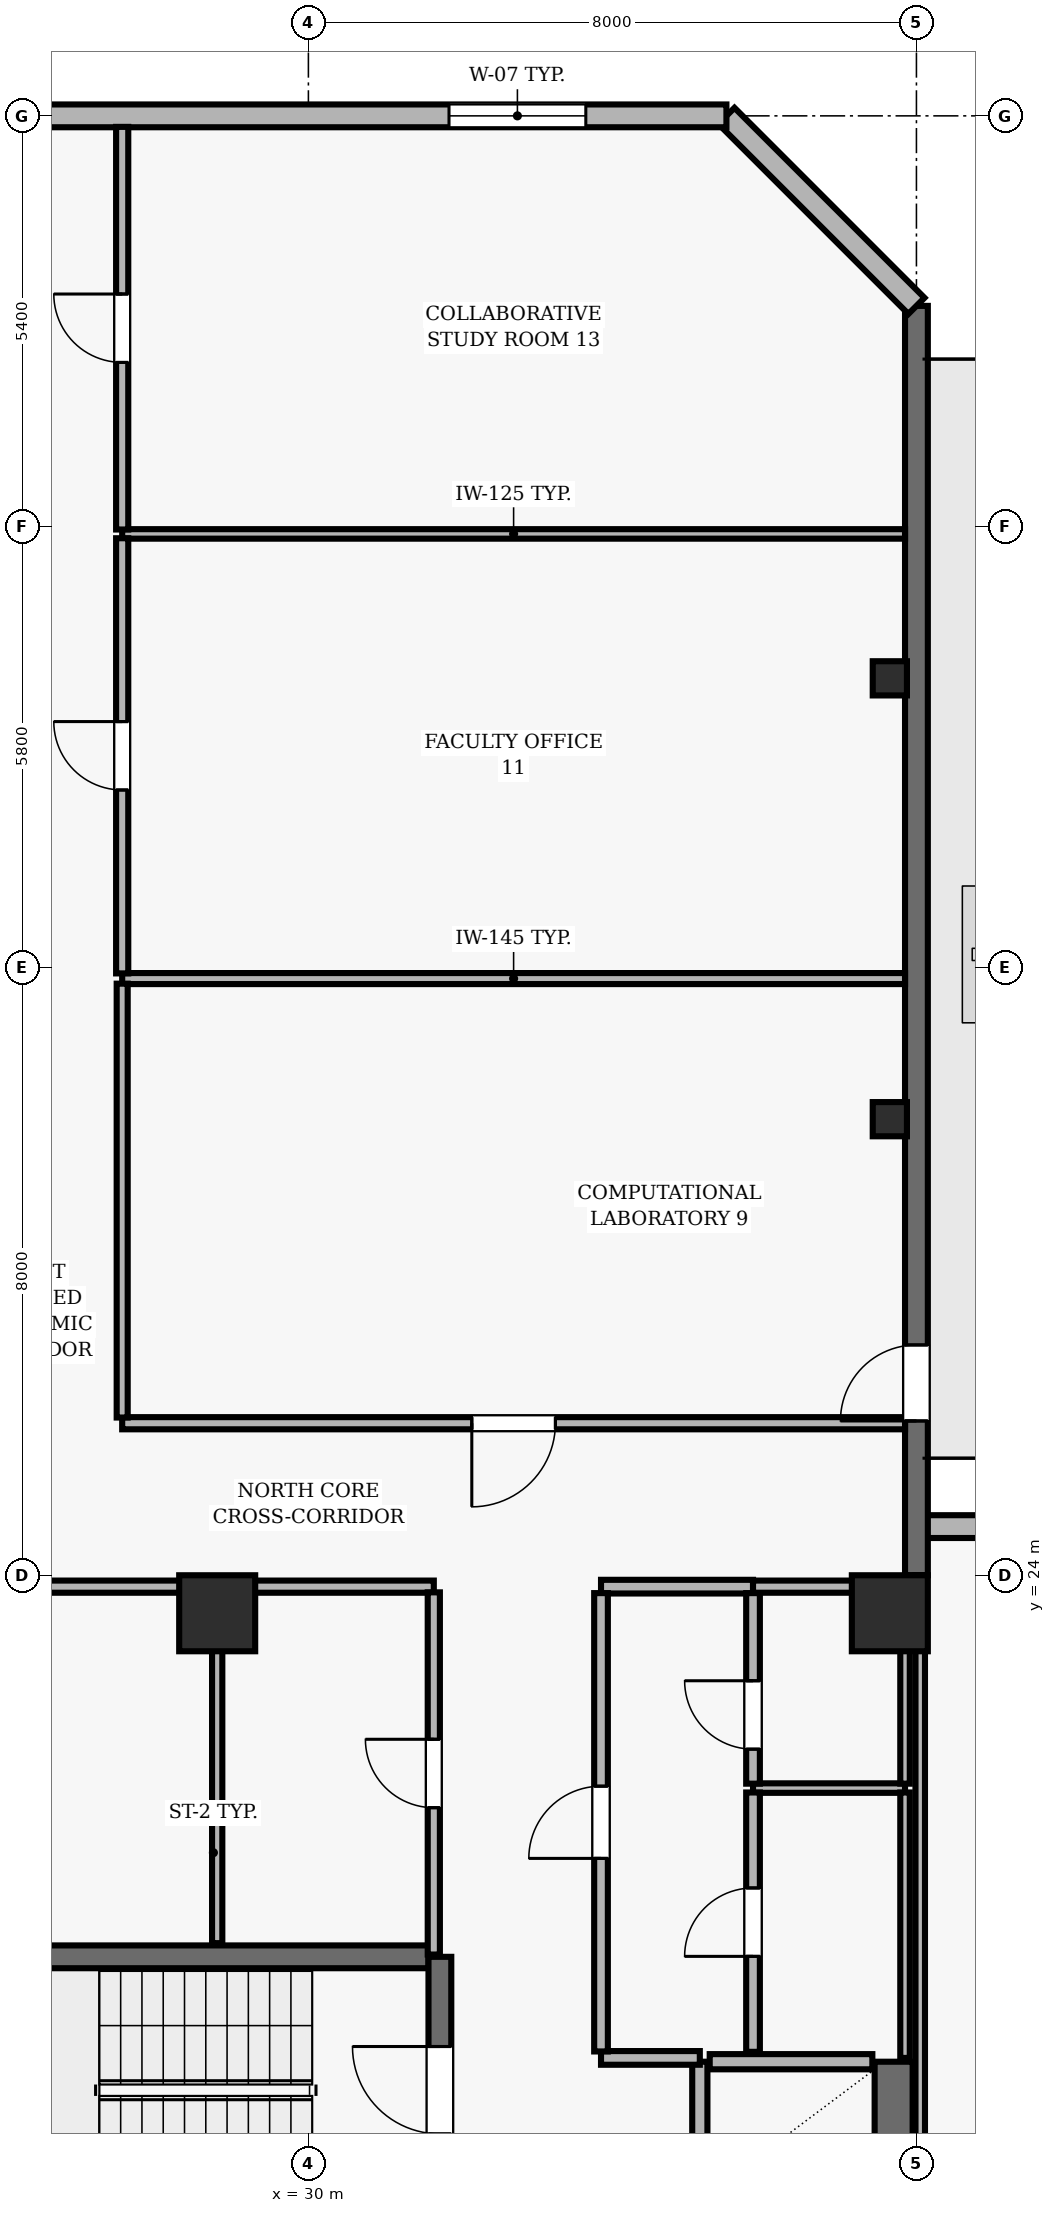
"""IFC4 building model, lengths in metres.
Left out: names, types, materials, properties, quantities, classifications, styles, units other than length and angle.
Written with IfcOpenShell. Run it as: python <this file> out.ifc"""

import sys

from ifc_helpers import new_model, si_unit, direction, frame, frame_2d, origin, origin_2d, place, context, subcontext, project, spatial, rectangle, hollow_rectangle, extrude, element, fill, save


model = new_model("IFC4")
c1 = context("Model", 3, precision=1e-05, world=origin(), true_north=direction((0.0, 1.0)))
c2 = subcontext(c1, "Body", "Model", "MODEL_VIEW")
j1 = project(units=[si_unit("LENGTHUNIT", "METRE"), si_unit("PLANEANGLEUNIT", "RADIAN")], contexts=[c1])
p1 = place(None, origin())
s1 = spatial("IfcSite", under=j1, at=p1, CompositionType="ELEMENT")
p2 = place(p1, origin())
s2 = spatial("IfcBuilding", under=s1, at=p2, CompositionType="ELEMENT")
p3 = place(p2, frame((0.0, 0.0, 183.6)))
s3 = spatial("IfcBuildingStorey", under=s2, at=p3, CompositionType="ELEMENT", Elevation=183.6)
for number, where, z_axis, x_axis in (
    (1, (28.8, 23.5, 0.0), (0.0, 0.0, 1.0), (1.0, 0.0, 0.0)),
    (2, (37.65, 23.5, 0.0), (0.0, 0.0, 1.0), (1.0, 0.0, 0.0)),
):
    element("IfcColumn", number, at=place(p3, frame(where, z_axis=z_axis, x_axis=x_axis)), inside=s3, PredefinedType="COLUMN", context=c2, shape_type="SweptSolid", body=[
        extrude(rectangle(XDim=1.0, YDim=1.0, at=origin_2d()), origin(), (0.0, 0.0, 1.0), 3.9),
    ])
for number, where, z_axis, x_axis in (
    (3, (37.65, 30.0, 0.0), (0.0, 0.0, 1.0), (1.0, 0.0, 0.0)),
    (4, (37.65, 35.8, 0.0), (0.0, 0.0, 1.0), (1.0, 0.0, 0.0)),
):
    element("IfcColumn", number, at=place(p3, frame(where, z_axis=z_axis, x_axis=x_axis)), inside=s3, PredefinedType="COLUMN", context=c2, shape_type="SweptSolid", body=[
        extrude(hollow_rectangle(XDim=0.45, YDim=0.45, WallThickness=0.02, at=origin_2d()), origin(), (0.0, 0.0, 1.0), 3.9),
    ])
p4 = place(p3, frame((48.8, 24.64, 0.0), z_axis=(0.0, 0.0, 1.0), x_axis=(-1.0, 0.0, 0.0)))
e5 = element("IfcWall", 5, at=p4, inside=s3, PredefinedType="SOLIDWALL", context=c2, shape_type="SweptSolid", body=[
    extrude(rectangle(XDim=10.8, YDim=0.3, at=frame_2d((5.4, 0.0))), origin(), (0.0, 0.0, 1.0), 3.69),
])
p5 = place(p4, frame((4.35, 0.0, 0.9)))
e6 = element("IfcOpeningElement", 6, at=p5, cuts=e5, PredefinedType="OPENING", context=c2, shape_type="SweptSolid", body=[
    extrude(rectangle(XDim=2.1, YDim=1.6, at=frame_2d((1.05, 0.8))), frame((0.0, 0.16, 0.0), z_axis=(0.0, -1.0, 0.0), x_axis=(1.0, 0.0, 0.0)), (0.0, 0.0, 1.0), 0.32),
])
p6 = place(p3, frame((38.0, 24.0, 0.0), z_axis=(0.0, 0.0, 1.0), x_axis=(0.0, 1.0, 0.0)))
e7 = element("IfcWall", 7, at=p6, inside=s3, PredefinedType="SOLIDWALL", context=c2, shape_type="SweptSolid", body=[
    extrude(rectangle(XDim=16.7, YDim=0.3, at=frame_2d((8.35, 0.0))), origin(), (0.0, 0.0, 1.0), 3.69),
])
p7 = place(p6, frame((2.03, 0.0, 0.0)))
e8 = element("IfcOpeningElement", 8, at=p7, cuts=e7, PredefinedType="OPENING", context=c2, shape_type="SweptSolid", body=[
    extrude(rectangle(XDim=1.0, YDim=2.2, at=frame_2d((0.5, 1.1))), frame((0.0, 0.16, 0.0), z_axis=(0.0, -1.0, 0.0), x_axis=(1.0, 0.0, 0.0)), (0.0, 0.0, 1.0), 0.32),
])
p8 = place(p3, frame((38.0, 40.7, 0.0), z_axis=(0.0, 0.0, 1.0), x_axis=(-0.707106781187, 0.707106781187, 0.0)))
e9 = element("IfcWall", 9, at=p8, inside=s3, PredefinedType="SOLIDWALL", context=c2, shape_type="SweptSolid", body=[
    extrude(rectangle(XDim=3.536, YDim=0.3, at=frame_2d((1.768, 0.0))), origin(), (0.0, 0.0, 1.0), 3.69),
])
p9 = place(p3, frame((35.5, 43.2, 0.0), z_axis=(0.0, 0.0, 1.0), x_axis=(-1.0, 0.0, 0.0)))
e10 = element("IfcWall", 10, at=p9, inside=s3, PredefinedType="SOLIDWALL", context=c2, shape_type="SweptSolid", body=[
    extrude(rectangle(XDim=11.0, YDim=0.3, at=frame_2d((5.5, 0.0))), origin(), (0.0, 0.0, 1.0), 3.69),
])
p10 = place(p9, frame((1.85, 0.0, 0.9)))
e11 = element("IfcOpeningElement", 11, at=p10, cuts=e10, PredefinedType="OPENING", context=c2, shape_type="SweptSolid", body=[
    extrude(rectangle(XDim=1.8, YDim=1.8, at=frame_2d((0.9, 0.9))), frame((0.0, 0.16, 0.0), z_axis=(0.0, -1.0, 0.0), x_axis=(1.0, 0.0, 0.0)), (0.0, 0.0, 1.0), 0.32),
])
p11 = place(p3, frame((31.58, 18.98, 0.0), z_axis=(0.0, 0.0, 1.0), x_axis=(-1.0, 0.0, 0.0)))
e12 = element("IfcWall", 12, at=p11, inside=s3, PredefinedType="SHEAR", context=c2, shape_type="SweptSolid", body=[
    extrude(rectangle(XDim=8.36, YDim=0.3, at=frame_2d((4.18, 0.0))), origin(), (0.0, 0.0, 1.0), 3.69),
])
p12 = place(p3, frame((31.73, 15.47, 0.0), z_axis=(0.0, 0.0, 1.0), x_axis=(0.0, 1.0, 0.0)))
e13 = element("IfcWall", 13, at=p12, inside=s3, PredefinedType="SHEAR", context=c2, shape_type="SweptSolid", body=[
    extrude(rectangle(XDim=3.51, YDim=0.3, at=frame_2d((1.755, 0.0))), origin(), (0.0, 0.0, 1.0), 3.69),
])
p13 = place(p12, frame((1.18, 0.0, 0.0)))
e14 = element("IfcOpeningElement", 14, at=p13, cuts=e13, PredefinedType="OPENING", context=c2, shape_type="SweptSolid", body=[
    extrude(rectangle(XDim=1.15, YDim=2.15, at=frame_2d((0.575, 1.075))), frame((0.0, 0.16, 0.0), z_axis=(0.0, -1.0, 0.0), x_axis=(1.0, 0.0, 0.0)), (0.0, 0.0, 1.0), 0.32),
])
p14 = place(p3, frame((35.15, 17.6, 0.0), z_axis=(0.0, 0.0, 1.0), x_axis=(0.0, -1.0, 0.0)))
e15 = element("IfcWall", 15, at=p14, inside=s3, PredefinedType="SOLIDWALL", context=c2, shape_type="SweptSolid", body=[
    extrude(rectangle(XDim=1.85, YDim=0.2, at=frame_2d((0.925, 0.0))), origin(), (0.0, 0.0, 1.0), 3.69),
])
p15 = place(p3, frame((37.7, 15.75, 0.0), z_axis=(0.0, 0.0, 1.0), x_axis=(0.0, 1.0, 0.0)))
e16 = element("IfcWall", 16, at=p15, inside=s3, PredefinedType="SHEAR", context=c2, shape_type="SweptSolid", body=[
    extrude(rectangle(XDim=1.85, YDim=0.5, at=frame_2d((0.925, 0.0))), origin(), (0.0, 0.0, 1.0), 3.69),
])
p16 = place(p3, frame((37.42, 17.6, 0.0), z_axis=(0.0, 0.0, 1.0), x_axis=(-1.0, 0.0, 0.0)))
e17 = element("IfcWall", 17, at=p16, inside=s3, PredefinedType="SOLIDWALL", context=c2, shape_type="SweptSolid", body=[
    extrude(rectangle(XDim=2.14, YDim=0.2, at=frame_2d((1.07, 0.0))), origin(), (0.0, 0.0, 1.0), 3.69),
])
p17 = place(p3, frame((28.8, 23.85, 0.0), z_axis=(0.0, 0.0, 1.0), x_axis=(-1.0, 0.0, 0.0)))
e18 = element("IfcWall", 18, at=p17, inside=s3, PredefinedType="PARTITIONING", context=c2, shape_type="SweptSolid", body=[
    extrude(rectangle(XDim=6.6, YDim=0.16, at=frame_2d((3.3, 0.0))), origin(), (0.0, 0.0, 1.0), 3.139),
])
p18 = place(p17, frame((2.86, 0.0, 0.0)))
e19 = element("IfcOpeningElement", 19, at=p18, cuts=e18, PredefinedType="OPENING", context=c2, shape_type="SweptSolid", body=[
    extrude(rectangle(XDim=0.88, YDim=2.1, at=frame_2d((0.44, 1.05))), frame((0.0, 0.09, 0.0), z_axis=(0.0, -1.0, 0.0), x_axis=(1.0, 0.0, 0.0)), (0.0, 0.0, 1.0), 0.18),
])
p19 = place(p3, frame((31.65, 23.85, 0.0), z_axis=(0.0, 0.0, 1.0), x_axis=(-1.0, 0.0, 0.0)))
e20 = element("IfcWall", 20, at=p19, inside=s3, PredefinedType="PARTITIONING", context=c2, shape_type="SweptSolid", body=[
    extrude(rectangle(XDim=2.85, YDim=0.16, at=frame_2d((1.425, 0.0))), origin(), (0.0, 0.0, 1.0), 3.139),
])
p20 = place(p3, frame((33.85, 17.65, 0.0), z_axis=(0.0, 0.0, 1.0), x_axis=(1.0, 0.0, 0.0)))
e21 = element("IfcWall", 21, at=p20, inside=s3, PredefinedType="PARTITIONING", context=c2, shape_type="SweptSolid", body=[
    extrude(rectangle(XDim=1.3, YDim=0.18, at=frame_2d((0.65, 0.0))), origin(), (0.0, 0.0, 1.0), 3.69),
])
p21 = place(p3, frame((35.85, 21.2, 0.0), z_axis=(0.0, 0.0, 1.0), x_axis=(1.0, 0.0, 0.0)))
e22 = element("IfcWall", 22, at=p21, inside=s3, PredefinedType="PARTITIONING", context=c2, shape_type="SweptSolid", body=[
    extrude(rectangle(XDim=2.0, YDim=0.125, at=frame_2d((1.0, 0.0))), origin(), (0.0, 0.0, 1.0), 3.139),
])
p22 = place(p3, frame((35.85, 23.85, 0.0), z_axis=(0.0, 0.0, 1.0), x_axis=(-1.0, 0.0, 0.0)))
e23 = element("IfcWall", 23, at=p22, inside=s3, PredefinedType="PARTITIONING", context=c2, shape_type="SweptSolid", body=[
    extrude(rectangle(XDim=2.0, YDim=0.18, at=frame_2d((1.0, 0.0))), origin(), (0.0, 0.0, 1.0), 3.139),
])
p23 = place(p3, frame((37.85, 23.85, 0.0), z_axis=(0.0, 0.0, 1.0), x_axis=(-1.0, 0.0, 0.0)))
e24 = element("IfcWall", 24, at=p23, inside=s3, PredefinedType="PARTITIONING", context=c2, shape_type="SweptSolid", body=[
    extrude(rectangle(XDim=2.0, YDim=0.16, at=frame_2d((1.0, 0.0))), origin(), (0.0, 0.0, 1.0), 3.139),
])
p24 = place(p3, frame((37.85, 26.0, 0.0), z_axis=(0.0, 0.0, 1.0), x_axis=(-1.0, 0.0, 0.0)))
e25 = element("IfcWall", 25, at=p24, inside=s3, PredefinedType="PARTITIONING", context=c2, shape_type="SweptSolid", body=[
    extrude(rectangle(XDim=10.3, YDim=0.16, at=frame_2d((5.15, 0.0))), origin(), (0.0, 0.0, 1.0), 3.69),
])
p25 = place(p24, frame((4.6, 0.0, 0.0)))
e26 = element("IfcOpeningElement", 26, at=p25, cuts=e25, PredefinedType="OPENING", context=c2, shape_type="SweptSolid", body=[
    extrude(rectangle(XDim=1.1, YDim=2.15, at=frame_2d((0.55, 1.075))), frame((0.0, 0.09, 0.0), z_axis=(0.0, -1.0, 0.0), x_axis=(1.0, 0.0, 0.0)), (0.0, 0.0, 1.0), 0.18),
])
p26 = place(p3, frame((37.85, 31.85, 0.0), z_axis=(0.0, 0.0, 1.0), x_axis=(-1.0, 0.0, 0.0)))
e27 = element("IfcWall", 27, at=p26, inside=s3, PredefinedType="PARTITIONING", context=c2, shape_type="SweptSolid", body=[
    extrude(rectangle(XDim=10.3, YDim=0.145, at=frame_2d((5.15, 0.0))), origin(), (0.0, 0.0, 1.0), 3.69),
])
p27 = place(p3, frame((37.85, 37.7, 0.0), z_axis=(0.0, 0.0, 1.0), x_axis=(-1.0, 0.0, 0.0)))
e28 = element("IfcWall", 28, at=p27, inside=s3, PredefinedType="PARTITIONING", context=c2, shape_type="SweptSolid", body=[
    extrude(rectangle(XDim=10.3, YDim=0.125, at=frame_2d((5.15, 0.0))), origin(), (0.0, 0.0, 1.0), 3.69),
])
p28 = place(p3, frame((27.55, 26.075, 0.0), z_axis=(0.0, 0.0, 1.0), x_axis=(0.0, 1.0, 0.0)))
e29 = element("IfcWall", 29, at=p28, inside=s3, PredefinedType="PARTITIONING", context=c2, shape_type="SweptSolid", body=[
    extrude(rectangle(XDim=5.708, YDim=0.145, at=frame_2d((2.854, 0.0))), origin(), (0.0, 0.0, 1.0), 3.69),
])
p29 = place(p3, frame((27.55, 31.918, 0.0), z_axis=(0.0, 0.0, 1.0), x_axis=(0.0, 1.0, 0.0)))
e30 = element("IfcWall", 30, at=p29, inside=s3, PredefinedType="PARTITIONING", context=c2, shape_type="SweptSolid", body=[
    extrude(rectangle(XDim=5.725, YDim=0.16, at=frame_2d((2.863, 0.0))), origin(), (0.0, 0.0, 1.0), 3.69),
])
p30 = place(p29, frame((2.413, 0.0, 0.0)))
e31 = element("IfcOpeningElement", 31, at=p30, cuts=e30, PredefinedType="OPENING", context=c2, shape_type="SweptSolid", body=[
    extrude(rectangle(XDim=0.9, YDim=2.1, at=frame_2d((0.45, 1.05))), frame((0.0, 0.09, 0.0), z_axis=(0.0, -1.0, 0.0), x_axis=(1.0, 0.0, 0.0)), (0.0, 0.0, 1.0), 0.18),
])
p31 = place(p3, frame((27.55, 37.758, 0.0), z_axis=(0.0, 0.0, 1.0), x_axis=(0.0, 1.0, 0.0)))
e32 = element("IfcWall", 32, at=p31, inside=s3, PredefinedType="PARTITIONING", context=c2, shape_type="SweptSolid", body=[
    extrude(rectangle(XDim=5.297, YDim=0.16, at=frame_2d((2.648, 0.0))), origin(), (0.0, 0.0, 1.0), 3.69),
])
p32 = place(p31, frame((2.198, 0.0, 0.0)))
e33 = element("IfcOpeningElement", 33, at=p32, cuts=e32, PredefinedType="OPENING", context=c2, shape_type="SweptSolid", body=[
    extrude(rectangle(XDim=0.9, YDim=2.1, at=frame_2d((0.45, 1.05))), frame((0.0, 0.09, 0.0), z_axis=(0.0, -1.0, 0.0), x_axis=(1.0, 0.0, 0.0)), (0.0, 0.0, 1.0), 0.18),
])
p33 = place(p3, frame((28.8, 23.775, 0.0), z_axis=(0.0, 0.0, 1.0), x_axis=(0.0, -1.0, 0.0)))
e34 = element("IfcWall", 34, at=p33, inside=s3, PredefinedType="PARTITIONING", context=c2, shape_type="SweptSolid", body=[
    extrude(rectangle(XDim=4.615, YDim=0.135, at=frame_2d((2.308, 0.0))), origin(), (0.0, 0.0, 1.0), 3.69),
])
p34 = place(p3, frame((31.65, 19.01, 0.0), z_axis=(0.0, 0.0, 1.0), x_axis=(0.0, 1.0, 0.0)))
e35 = element("IfcWall", 35, at=p34, inside=s3, PredefinedType="PARTITIONING", context=c2, shape_type="SweptSolid", body=[
    extrude(rectangle(XDim=4.765, YDim=0.16, at=frame_2d((2.382, 0.0))), origin(), (0.0, 0.0, 1.0), 3.69),
])
p35 = place(p34, frame((1.932, 0.0, 0.0)))
e36 = element("IfcOpeningElement", 36, at=p35, cuts=e35, PredefinedType="OPENING", context=c2, shape_type="SweptSolid", body=[
    extrude(rectangle(XDim=0.9, YDim=2.1, at=frame_2d((0.45, 1.05))), frame((0.0, 0.09, 0.0), z_axis=(0.0, -1.0, 0.0), x_axis=(1.0, 0.0, 0.0)), (0.0, 0.0, 1.0), 0.18),
])
p36 = place(p3, frame((33.85, 17.735, 0.0), z_axis=(0.0, 0.0, 1.0), x_axis=(0.0, 1.0, 0.0)))
e37 = element("IfcWall", 37, at=p36, inside=s3, PredefinedType="PARTITIONING", context=c2, shape_type="SweptSolid", body=[
    extrude(rectangle(XDim=6.03, YDim=0.18, at=frame_2d((3.015, 0.0))), origin(), (0.0, 0.0, 1.0), 3.69),
])
p37 = place(p36, frame((2.54, 0.0, 0.0)))
e38 = element("IfcOpeningElement", 38, at=p37, cuts=e37, PredefinedType="OPENING", context=c2, shape_type="SweptSolid", body=[
    extrude(rectangle(XDim=0.95, YDim=2.1, at=frame_2d((0.475, 1.05))), frame((0.0, 0.1, 0.0), z_axis=(0.0, -1.0, 0.0), x_axis=(1.0, 0.0, 0.0)), (0.0, 0.0, 1.0), 0.2),
])
p38 = place(p3, frame((35.85, 17.73, 0.0), z_axis=(0.0, 0.0, 1.0), x_axis=(0.0, 1.0, 0.0)))
e39 = element("IfcWall", 39, at=p38, inside=s3, PredefinedType="PARTITIONING", context=c2, shape_type="SweptSolid", body=[
    extrude(rectangle(XDim=3.412, YDim=0.18, at=frame_2d((1.706, 0.0))), origin(), (0.0, 0.0, 1.0), 3.69),
])
p39 = place(p38, frame((1.256, 0.0, 0.0)))
e40 = element("IfcOpeningElement", 40, at=p39, cuts=e39, PredefinedType="OPENING", context=c2, shape_type="SweptSolid", body=[
    extrude(rectangle(XDim=0.9, YDim=2.1, at=frame_2d((0.45, 1.05))), frame((0.0, 0.1, 0.0), z_axis=(0.0, -1.0, 0.0), x_axis=(1.0, 0.0, 0.0)), (0.0, 0.0, 1.0), 0.2),
])
p40 = place(p3, frame((35.85, 21.258, 0.0), z_axis=(0.0, 0.0, 1.0), x_axis=(0.0, 1.0, 0.0)))
e41 = element("IfcWall", 41, at=p40, inside=s3, PredefinedType="PARTITIONING", context=c2, shape_type="SweptSolid", body=[
    extrude(rectangle(XDim=2.507, YDim=0.18, at=frame_2d((1.253, 0.0))), origin(), (0.0, 0.0, 1.0), 3.69),
])
p41 = place(p40, frame((0.454, 0.0, 0.0)))
e42 = element("IfcOpeningElement", 42, at=p41, cuts=e41, PredefinedType="OPENING", context=c2, shape_type="SweptSolid", body=[
    extrude(rectangle(XDim=0.9, YDim=2.1, at=frame_2d((0.45, 1.05))), frame((0.0, 0.1, 0.0), z_axis=(0.0, -1.0, 0.0), x_axis=(1.0, 0.0, 0.0)), (0.0, 0.0, 1.0), 0.2),
])
p42 = place(p3, frame((37.85, 17.65, 0.0), z_axis=(0.0, 0.0, 1.0), x_axis=(0.0, 1.0, 0.0)))
e43 = element("IfcWall", 43, at=p42, inside=s3, PredefinedType="PARTITIONING", context=c2, shape_type="SweptSolid", body=[
    extrude(rectangle(XDim=3.492, YDim=0.125, at=frame_2d((1.746, 0.0))), origin(), (0.0, 0.0, 1.0), 3.139),
])
p43 = place(p3, frame((37.85, 21.258, 0.0), z_axis=(0.0, 0.0, 1.0), x_axis=(0.0, 1.0, 0.0)))
e44 = element("IfcWall", 44, at=p43, inside=s3, PredefinedType="PARTITIONING", context=c2, shape_type="SweptSolid", body=[
    extrude(rectangle(XDim=2.517, YDim=0.125, at=frame_2d((1.258, 0.0))), origin(), (0.0, 0.0, 1.0), 3.139),
])
p44 = place(p3, frame((38.05, 24.0, 0.0), z_axis=(0.0, 0.0, 1.0), x_axis=(0.0, -1.0, 0.0)))
e45 = element("IfcWall", 45, at=p44, inside=s3, PredefinedType="PARTITIONING", context=c2, shape_type="SweptSolid", body=[
    extrude(rectangle(XDim=7.925, YDim=0.125, at=frame_2d((3.962, 0.0))), origin(), (0.0, 0.0, 1.0), 3.139),
])
p45 = place(p7, origin())
e46 = element("IfcDoor", 46, at=p45, inside=s3, OperationType="SINGLE_SWING_LEFT", PredefinedType="DOOR", context=c2, shape_type="SweptSolid", body=[
    extrude(rectangle(XDim=1.0, YDim=2.2, at=frame_2d((0.5, 1.1))), frame((0.0, 0.025, 0.0), z_axis=(0.0, -1.0, 0.0), x_axis=(1.0, 0.0, 0.0)), (0.0, 0.0, 1.0), 0.05),
])
fill(e8, e46)
p46 = place(p10, origin())
e47 = element("IfcWindow", 47, at=p46, inside=s3, PartitioningType="SINGLE_PANEL", PredefinedType="WINDOW", context=c2, shape_type="SweptSolid", body=[
    extrude(rectangle(XDim=1.8, YDim=1.8, at=frame_2d((0.9, 0.9))), frame((0.0, 0.03, 0.0), z_axis=(0.0, -1.0, 0.0), x_axis=(1.0, 0.0, 0.0)), (0.0, 0.0, 1.0), 0.06),
])
fill(e11, e47)
p47 = place(p13, origin())
e48 = element("IfcDoor", 48, at=p47, inside=s3, OperationType="SINGLE_SWING_RIGHT", PredefinedType="DOOR", context=c2, shape_type="SweptSolid", body=[
    extrude(rectangle(XDim=1.15, YDim=2.15, at=frame_2d((0.575, 1.075))), frame((0.0, 0.025, 0.0), z_axis=(0.0, -1.0, 0.0), x_axis=(1.0, 0.0, 0.0)), (0.0, 0.0, 1.0), 0.05),
])
fill(e14, e48)
p48 = place(p37, origin())
e49 = element("IfcDoor", 49, at=p48, inside=s3, OperationType="SINGLE_SWING_LEFT", PredefinedType="DOOR", context=c2, shape_type="SweptSolid", body=[
    extrude(rectangle(XDim=0.95, YDim=2.1, at=frame_2d((0.475, 1.05))), frame((0.0, 0.025, 0.0), z_axis=(0.0, -1.0, 0.0), x_axis=(1.0, 0.0, 0.0)), (0.0, 0.0, 1.0), 0.05),
])
fill(e38, e49)
p49 = place(p41, origin())
e50 = element("IfcDoor", 50, at=p49, inside=s3, OperationType="SINGLE_SWING_RIGHT", PredefinedType="DOOR", context=c2, shape_type="SweptSolid", body=[
    extrude(rectangle(XDim=0.9, YDim=2.1, at=frame_2d((0.45, 1.05))), frame((0.0, 0.025, 0.0), z_axis=(0.0, -1.0, 0.0), x_axis=(1.0, 0.0, 0.0)), (0.0, 0.0, 1.0), 0.05),
])
fill(e42, e50)
p50 = place(p39, origin())
e51 = element("IfcDoor", 51, at=p50, inside=s3, OperationType="SINGLE_SWING_LEFT", PredefinedType="DOOR", context=c2, shape_type="SweptSolid", body=[
    extrude(rectangle(XDim=0.9, YDim=2.1, at=frame_2d((0.45, 1.05))), frame((0.0, 0.025, 0.0), z_axis=(0.0, -1.0, 0.0), x_axis=(1.0, 0.0, 0.0)), (0.0, 0.0, 1.0), 0.05),
])
fill(e40, e51)
p51 = place(p35, origin())
e52 = element("IfcDoor", 52, at=p51, inside=s3, OperationType="SINGLE_SWING_RIGHT", PredefinedType="DOOR", context=c2, shape_type="SweptSolid", body=[
    extrude(rectangle(XDim=0.9, YDim=2.1, at=frame_2d((0.45, 1.05))), frame((0.0, 0.025, 0.0), z_axis=(0.0, -1.0, 0.0), x_axis=(1.0, 0.0, 0.0)), (0.0, 0.0, 1.0), 0.05),
])
fill(e36, e52)
p52 = place(p25, origin())
e53 = element("IfcDoor", 53, at=p52, inside=s3, OperationType="SINGLE_SWING_RIGHT", PredefinedType="DOOR", context=c2, shape_type="SweptSolid", body=[
    extrude(rectangle(XDim=1.1, YDim=2.15, at=frame_2d((0.55, 1.075))), frame((0.0, 0.025, 0.0), z_axis=(0.0, -1.0, 0.0), x_axis=(1.0, 0.0, 0.0)), (0.0, 0.0, 1.0), 0.05),
])
fill(e26, e53)
p53 = place(p30, origin())
e54 = element("IfcDoor", 54, at=p53, inside=s3, OperationType="SINGLE_SWING_RIGHT", PredefinedType="DOOR", context=c2, shape_type="SweptSolid", body=[
    extrude(rectangle(XDim=0.9, YDim=2.1, at=frame_2d((0.45, 1.05))), frame((0.0, 0.025, 0.0), z_axis=(0.0, -1.0, 0.0), x_axis=(1.0, 0.0, 0.0)), (0.0, 0.0, 1.0), 0.05),
])
fill(e31, e54)
p54 = place(p32, origin())
e55 = element("IfcDoor", 55, at=p54, inside=s3, OperationType="SINGLE_SWING_RIGHT", PredefinedType="DOOR", context=c2, shape_type="SweptSolid", body=[
    extrude(rectangle(XDim=0.9, YDim=2.1, at=frame_2d((0.45, 1.05))), frame((0.0, 0.025, 0.0), z_axis=(0.0, -1.0, 0.0), x_axis=(1.0, 0.0, 0.0)), (0.0, 0.0, 1.0), 0.05),
])
fill(e33, e55)
save(model, sys.argv[1])
